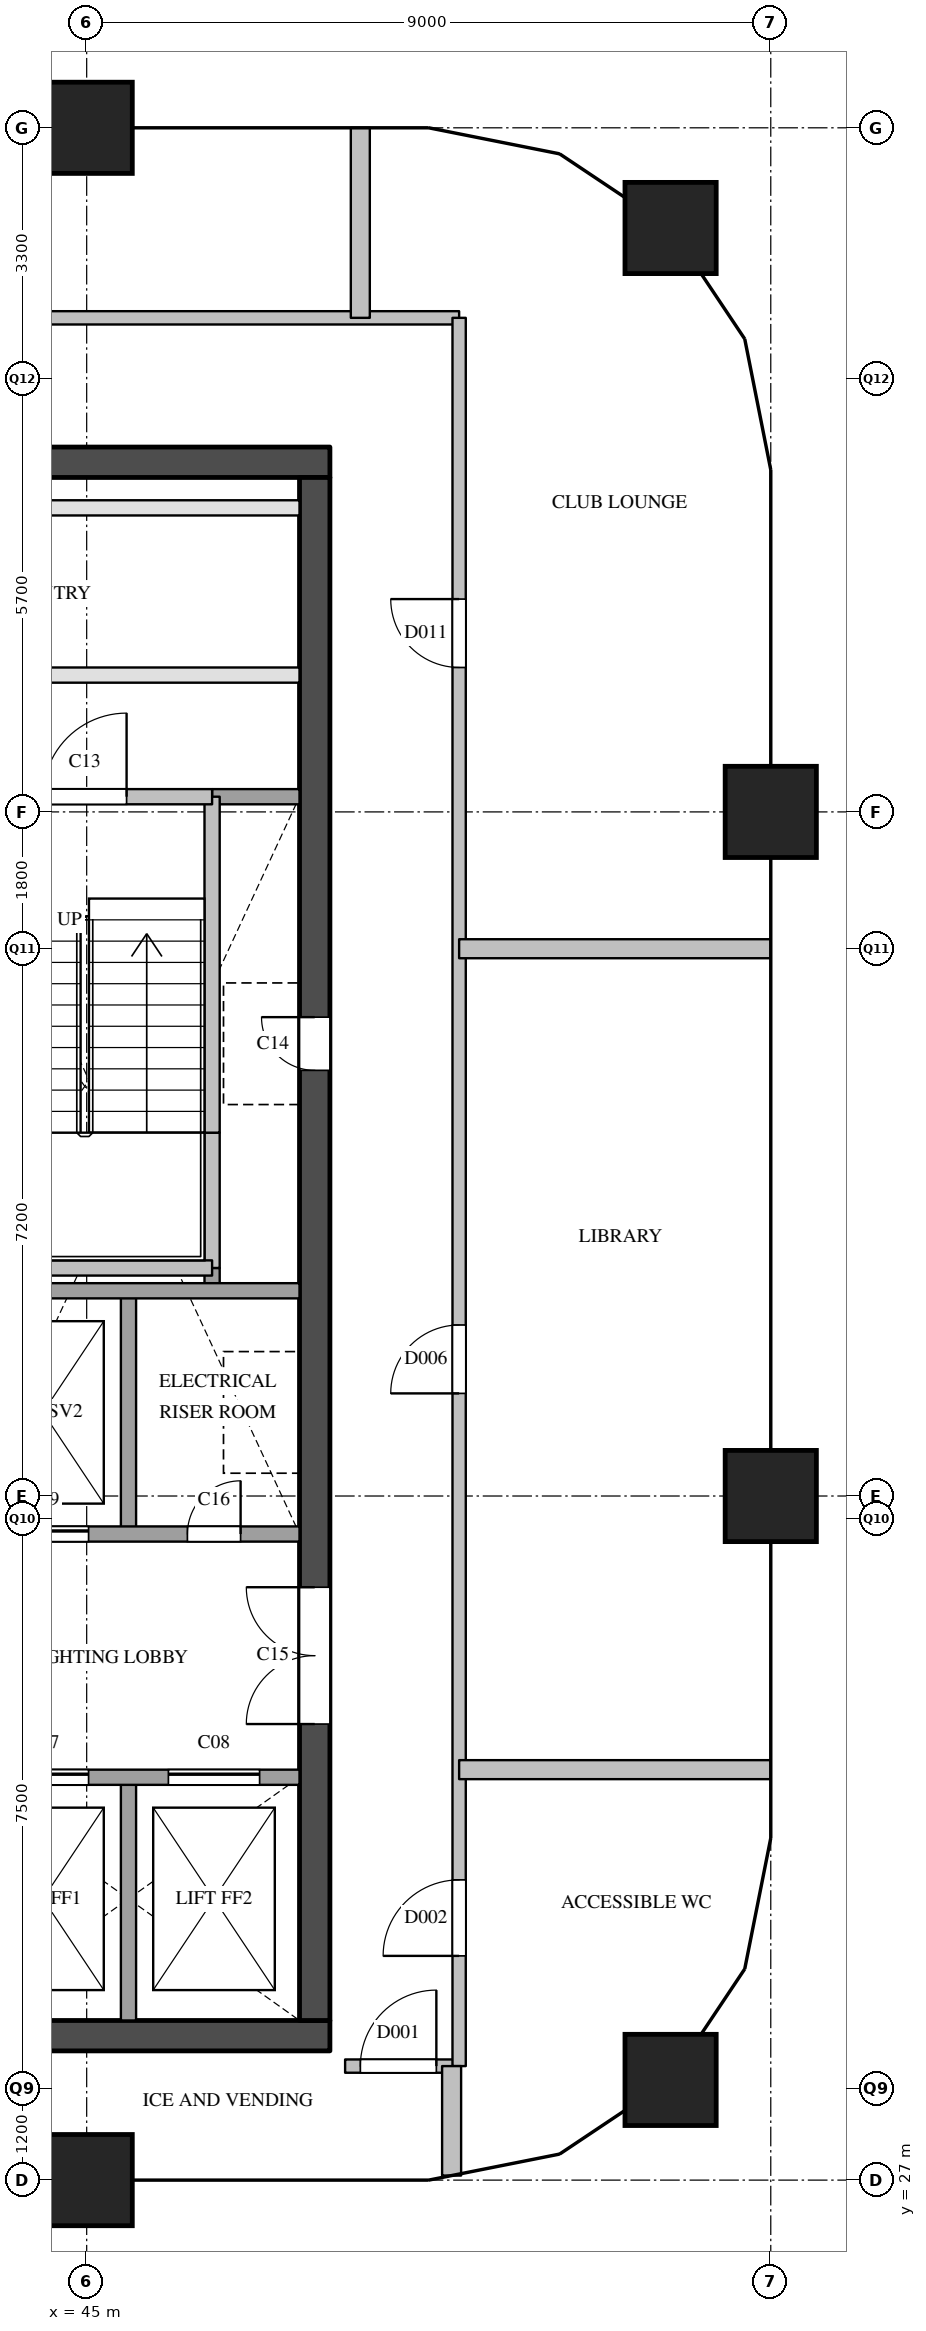
"""IFC4 building model, lengths in metres.
Left out: names, types, materials, properties, quantities, classifications, styles, units other than length and angle.
Written with IfcOpenShell. Run it as: python <this file> out.ifc"""

import sys

from ifc_helpers import new_model, si_unit, direction, frame, frame_2d, origin, origin_2d, place, context, subcontext, project, spatial, rectangle, extrude, element, fill, save


model = new_model("IFC4")
c1 = context("Model", 3, precision=1e-05, world=origin(), true_north=direction((0.0, 1.0)))
c2 = subcontext(c1, "Body", "Model", "MODEL_VIEW")
j1 = project(units=[si_unit("LENGTHUNIT", "METRE"), si_unit("PLANEANGLEUNIT", "RADIAN")], contexts=[c1])
p1 = place(None, origin())
s1 = spatial("IfcSite", under=j1, at=p1, CompositionType="ELEMENT")
p2 = place(p1, origin())
s2 = spatial("IfcBuilding", under=s1, at=p2, CompositionType="ELEMENT")
p3 = place(p2, frame((0.0, 0.0, 207.2)))
s3 = spatial("IfcBuildingStorey", under=s2, at=p3, CompositionType="ELEMENT", Elevation=207.2)
for number, where, z_axis, x_axis in (
    (1, (45.0, 27.0, 0.0), (0.0, 0.0, 1.0), (1.0, 0.0, 0.0)),
    (2, (45.0, 54.0, 0.0), (0.0, 0.0, 1.0), (1.0, 0.0, 0.0)),
    (3, (52.682, 28.318, 0.0), (0.0, 0.0, 1.0), (1.0, 0.0, 0.0)),
    (4, (54.0, 36.0, 0.0), (0.0, 0.0, 1.0), (1.0, 0.0, 0.0)),
    (5, (54.0, 45.0, 0.0), (0.0, 0.0, 1.0), (1.0, 0.0, 0.0)),
    (6, (52.682, 52.682, 0.0), (0.0, 0.0, 1.0), (1.0, 0.0, 0.0)),
):
    element("IfcColumn", number, at=place(p3, frame(where, z_axis=z_axis, x_axis=x_axis)), inside=s3, PredefinedType="COLUMN", context=c2, shape_type="SweptSolid", body=[
        extrude(rectangle(XDim=1.2, YDim=1.2, at=origin_2d()), origin(), (0.0, 0.0, 1.0), 3.9),
    ])
p4 = place(p3, frame((36.2, 28.9, 0.0), z_axis=(0.0, 0.0, 1.0), x_axis=(1.0, 0.0, 0.0)))
e7 = element("IfcWall", 7, at=p4, inside=s3, PredefinedType="SHEAR", context=c2, shape_type="SweptSolid", body=[
    extrude(rectangle(XDim=12.0, YDim=0.4, at=frame_2d((6.0, 0.0))), origin(), (0.0, 0.0, 1.0), 3.6),
])
p5 = place(p4, frame((0.85, 0.0, 0.0)))
e8 = element("IfcOpeningElement", 8, at=p5, cuts=e7, PredefinedType="OPENING", context=c2, shape_type="SweptSolid", body=[
    extrude(rectangle(XDim=1.2, YDim=2.1, at=frame_2d((0.6, 1.05))), frame((0.0, 0.21, 0.0), z_axis=(0.0, -1.0, 0.0), x_axis=(1.0, 0.0, 0.0)), (0.0, 0.0, 1.0), 0.42),
])
p6 = place(p4, frame((2.95, 0.0, 0.0)))
e9 = element("IfcOpeningElement", 9, at=p6, cuts=e7, PredefinedType="OPENING", context=c2, shape_type="SweptSolid", body=[
    extrude(rectangle(XDim=1.2, YDim=2.1, at=frame_2d((0.6, 1.05))), frame((0.0, 0.21, 0.0), z_axis=(0.0, -1.0, 0.0), x_axis=(1.0, 0.0, 0.0)), (0.0, 0.0, 1.0), 0.42),
])
p7 = place(p4, frame((5.05, 0.0, 0.0)))
e10 = element("IfcOpeningElement", 10, at=p7, cuts=e7, PredefinedType="OPENING", context=c2, shape_type="SweptSolid", body=[
    extrude(rectangle(XDim=1.2, YDim=2.1, at=frame_2d((0.6, 1.05))), frame((0.0, 0.21, 0.0), z_axis=(0.0, -1.0, 0.0), x_axis=(1.0, 0.0, 0.0)), (0.0, 0.0, 1.0), 0.42),
])
p8 = place(p3, frame((36.2, 49.6, 0.0), z_axis=(0.0, 0.0, 1.0), x_axis=(1.0, 0.0, 0.0)))
e11 = element("IfcWall", 11, at=p8, inside=s3, PredefinedType="SHEAR", context=c2, shape_type="SweptSolid", body=[
    extrude(rectangle(XDim=12.0, YDim=0.4, at=frame_2d((6.0, 0.0))), origin(), (0.0, 0.0, 1.0), 3.6),
])
p9 = place(p3, frame((48.0, 29.1, 0.0), z_axis=(0.0, 0.0, 1.0), x_axis=(0.0, 1.0, 0.0)))
e12 = element("IfcWall", 12, at=p9, inside=s3, PredefinedType="SHEAR", context=c2, shape_type="SweptSolid", body=[
    extrude(rectangle(XDim=20.3, YDim=0.4, at=frame_2d((10.15, 0.0))), origin(), (0.0, 0.0, 1.0), 3.6),
])
p10 = place(p9, frame((12.5, 0.0, 0.0)))
e13 = element("IfcOpeningElement", 13, at=p10, cuts=e12, PredefinedType="OPENING", context=c2, shape_type="SweptSolid", body=[
    extrude(rectangle(XDim=0.7, YDim=2.1, at=frame_2d((0.35, 1.05))), frame((0.0, 0.21, 0.0), z_axis=(0.0, -1.0, 0.0), x_axis=(1.0, 0.0, 0.0)), (0.0, 0.0, 1.0), 0.42),
])
p11 = place(p9, frame((3.9, 0.0, 0.0)))
e14 = element("IfcOpeningElement", 14, at=p11, cuts=e12, PredefinedType="OPENING", context=c2, shape_type="SweptSolid", body=[
    extrude(rectangle(XDim=1.8, YDim=2.1, at=frame_2d((0.9, 1.05))), frame((0.0, 0.21, 0.0), z_axis=(0.0, -1.0, 0.0), x_axis=(1.0, 0.0, 0.0)), (0.0, 0.0, 1.0), 0.42),
])
for number, where, z_axis, x_axis in (
    (15, (45.55, 29.1, 0.0), (0.0, 0.0, 1.0), (0.0, 1.0, 0.0)),
    (16, (45.55, 35.5, 0.0), (0.0, 0.0, 1.0), (0.0, 1.0, 0.0)),
):
    element("IfcWall", number, at=place(p3, frame(where, z_axis=z_axis, x_axis=x_axis)), inside=s3, PredefinedType="SOLIDWALL", context=c2, shape_type="SweptSolid", body=[
        extrude(rectangle(XDim=3.2, YDim=0.2, at=frame_2d((1.6, 0.0))), origin(), (0.0, 0.0, 1.0), 3.6),
    ])
p12 = place(p3, frame((46.65, 38.7, 0.0), z_axis=(0.0, 0.0, 1.0), x_axis=(0.0, 1.0, 0.0)))
e17 = element("IfcWall", 17, at=p12, inside=s3, PredefinedType="SOLIDWALL", context=c2, shape_type="SweptSolid", body=[
    extrude(rectangle(XDim=0.3, YDim=0.2, at=frame_2d((0.15, 0.0))), origin(), (0.0, 0.0, 1.0), 3.6),
])
p13 = place(p3, frame((46.65, 39.0, 0.0), z_axis=(0.0, 0.0, 1.0), x_axis=(0.0, 1.0, 0.0)))
e18 = element("IfcWall", 18, at=p13, inside=s3, PredefinedType="SOLIDWALL", context=c2, shape_type="SweptSolid", body=[
    extrude(rectangle(XDim=1.78, YDim=0.2, at=frame_2d((0.89, 0.0))), origin(), (0.0, 0.0, 1.0), 3.6),
])
p14 = place(p3, frame((46.65, 40.78, 0.0), z_axis=(0.0, 0.0, 1.0), x_axis=(0.0, 1.0, 0.0)))
e19 = element("IfcWall", 19, at=p14, inside=s3, PredefinedType="SOLIDWALL", context=c2, shape_type="SweptSolid", body=[
    extrude(rectangle(XDim=4.42, YDim=0.2, at=frame_2d((2.21, 0.0))), origin(), (0.0, 0.0, 1.0), 3.6),
])
p15 = place(p3, frame((36.6, 32.3, 0.0), z_axis=(0.0, 0.0, 1.0), x_axis=(1.0, 0.0, 0.0)))
e20 = element("IfcWall", 20, at=p15, inside=s3, PredefinedType="SOLIDWALL", context=c2, shape_type="SweptSolid", body=[
    extrude(rectangle(XDim=11.2, YDim=0.2, at=frame_2d((5.6, 0.0))), origin(), (0.0, 0.0, 1.0), 3.6),
])
p16 = place(p15, frame((7.225, 0.0, 0.0)))
e21 = element("IfcOpeningElement", 21, at=p16, cuts=e20, PredefinedType="OPENING", context=c2, shape_type="SweptSolid", body=[
    extrude(rectangle(XDim=1.2, YDim=2.1, at=frame_2d((0.6, 1.05))), frame((0.0, 0.11, 0.0), z_axis=(0.0, -1.0, 0.0), x_axis=(1.0, 0.0, 0.0)), (0.0, 0.0, 1.0), 0.22),
])
p17 = place(p15, frame((9.475, 0.0, 0.0)))
e22 = element("IfcOpeningElement", 22, at=p17, cuts=e20, PredefinedType="OPENING", context=c2, shape_type="SweptSolid", body=[
    extrude(rectangle(XDim=1.2, YDim=2.1, at=frame_2d((0.6, 1.05))), frame((0.0, 0.11, 0.0), z_axis=(0.0, -1.0, 0.0), x_axis=(1.0, 0.0, 0.0)), (0.0, 0.0, 1.0), 0.22),
])
p18 = place(p3, frame((43.3, 35.5, 0.0), z_axis=(0.0, 0.0, 1.0), x_axis=(1.0, 0.0, 0.0)))
e23 = element("IfcWall", 23, at=p18, inside=s3, PredefinedType="SOLIDWALL", context=c2, shape_type="SweptSolid", body=[
    extrude(rectangle(XDim=4.5, YDim=0.2, at=frame_2d((2.25, 0.0))), origin(), (0.0, 0.0, 1.0), 3.6),
])
p19 = place(p18, frame((0.525, 0.0, 0.0)))
e24 = element("IfcOpeningElement", 24, at=p19, cuts=e23, PredefinedType="OPENING", context=c2, shape_type="SweptSolid", body=[
    extrude(rectangle(XDim=1.2, YDim=2.1, at=frame_2d((0.6, 1.05))), frame((0.0, 0.11, 0.0), z_axis=(0.0, -1.0, 0.0), x_axis=(1.0, 0.0, 0.0)), (0.0, 0.0, 1.0), 0.22),
])
p20 = place(p18, frame((3.025, 0.0, 0.0)))
e25 = element("IfcOpeningElement", 25, at=p20, cuts=e23, PredefinedType="OPENING", context=c2, shape_type="SweptSolid", body=[
    extrude(rectangle(XDim=0.7, YDim=2.1, at=frame_2d((0.35, 1.05))), frame((0.0, 0.11, 0.0), z_axis=(0.0, -1.0, 0.0), x_axis=(1.0, 0.0, 0.0)), (0.0, 0.0, 1.0), 0.22),
])
p21 = place(p3, frame((43.3, 38.7, 0.0), z_axis=(0.0, 0.0, 1.0), x_axis=(1.0, 0.0, 0.0)))
e26 = element("IfcWall", 26, at=p21, inside=s3, PredefinedType="SOLIDWALL", context=c2, shape_type="SweptSolid", body=[
    extrude(rectangle(XDim=4.5, YDim=0.2, at=frame_2d((2.25, 0.0))), origin(), (0.0, 0.0, 1.0), 3.6),
])
p22 = place(p3, frame((43.4, 39.0, 0.0), z_axis=(0.0, 0.0, 1.0), x_axis=(1.0, 0.0, 0.0)))
e27 = element("IfcWall", 27, at=p22, inside=s3, PredefinedType="SOLIDWALL", context=c2, shape_type="SweptSolid", body=[
    extrude(rectangle(XDim=3.25, YDim=0.2, at=frame_2d((1.625, 0.0))), origin(), (0.0, 0.0, 1.0), 3.6),
])
p23 = place(p3, frame((46.65, 45.2, 0.0), z_axis=(0.0, 0.0, 1.0), x_axis=(1.0, 0.0, 0.0)))
e28 = element("IfcWall", 28, at=p23, inside=s3, PredefinedType="SOLIDWALL", context=c2, shape_type="SweptSolid", body=[
    extrude(rectangle(XDim=1.15, YDim=0.2, at=frame_2d((0.575, 0.0))), origin(), (0.0, 0.0, 1.0), 3.6),
])
p24 = place(p3, frame((36.6, 45.2, 0.0), z_axis=(0.0, 0.0, 1.0), x_axis=(1.0, 0.0, 0.0)))
e29 = element("IfcWall", 29, at=p24, inside=s3, PredefinedType="SOLIDWALL", context=c2, shape_type="SweptSolid", body=[
    extrude(rectangle(XDim=10.05, YDim=0.2, at=frame_2d((5.025, 0.0))), origin(), (0.0, 0.0, 1.0), 3.6),
])
p25 = place(p24, frame((1.125, 0.0, 0.0)))
e30 = element("IfcOpeningElement", 30, at=p25, cuts=e29, PredefinedType="OPENING", context=c2, shape_type="SweptSolid", body=[
    extrude(rectangle(XDim=1.1, YDim=2.1, at=frame_2d((0.55, 1.05))), frame((0.0, 0.11, 0.0), z_axis=(0.0, -1.0, 0.0), x_axis=(1.0, 0.0, 0.0)), (0.0, 0.0, 1.0), 0.22),
])
p26 = place(p24, frame((4.475, 0.0, 0.0)))
e31 = element("IfcOpeningElement", 31, at=p26, cuts=e29, PredefinedType="OPENING", context=c2, shape_type="SweptSolid", body=[
    extrude(rectangle(XDim=1.1, YDim=2.1, at=frame_2d((0.55, 1.05))), frame((0.0, 0.11, 0.0), z_axis=(0.0, -1.0, 0.0), x_axis=(1.0, 0.0, 0.0)), (0.0, 0.0, 1.0), 0.22),
])
p27 = place(p24, frame((7.825, 0.0, 0.0)))
e32 = element("IfcOpeningElement", 32, at=p27, cuts=e29, PredefinedType="OPENING", context=c2, shape_type="SweptSolid", body=[
    extrude(rectangle(XDim=1.1, YDim=2.1, at=frame_2d((0.55, 1.05))), frame((0.0, 0.11, 0.0), z_axis=(0.0, -1.0, 0.0), x_axis=(1.0, 0.0, 0.0)), (0.0, 0.0, 1.0), 0.22),
])
p28 = place(p3, frame((36.6, 46.8, 0.0), z_axis=(0.0, 0.0, 1.0), x_axis=(1.0, 0.0, 0.0)))
e33 = element("IfcWall", 33, at=p28, inside=s3, PredefinedType="PARTITIONING", context=c2, shape_type="SweptSolid", body=[
    extrude(rectangle(XDim=11.2, YDim=0.2, at=frame_2d((5.6, 0.0))), origin(), (0.0, 0.0, 1.0), 3.6),
])
p29 = place(p28, frame((0.67, 0.0, 0.0)))
e34 = element("IfcOpeningElement", 34, at=p29, cuts=e33, PredefinedType="OPENING", context=c2, shape_type="SweptSolid", body=[
    extrude(rectangle(XDim=0.9, YDim=2.1, at=frame_2d((0.45, 1.05))), frame((0.0, 0.11, 0.0), z_axis=(0.0, -1.0, 0.0), x_axis=(1.0, 0.0, 0.0)), (0.0, 0.0, 1.0), 0.22),
])
p30 = place(p28, frame((6.27, 0.0, 0.0)))
e35 = element("IfcOpeningElement", 35, at=p30, cuts=e33, PredefinedType="OPENING", context=c2, shape_type="SweptSolid", body=[
    extrude(rectangle(XDim=0.9, YDim=2.1, at=frame_2d((0.45, 1.05))), frame((0.0, 0.11, 0.0), z_axis=(0.0, -1.0, 0.0), x_axis=(1.0, 0.0, 0.0)), (0.0, 0.0, 1.0), 0.22),
])
p31 = place(p3, frame((36.6, 49.0, 0.0), z_axis=(0.0, 0.0, 1.0), x_axis=(1.0, 0.0, 0.0)))
e36 = element("IfcWall", 36, at=p31, inside=s3, PredefinedType="PARTITIONING", context=c2, shape_type="SweptSolid", body=[
    extrude(rectangle(XDim=11.2, YDim=0.2, at=frame_2d((5.6, 0.0))), origin(), (0.0, 0.0, 1.0), 3.6),
])
p32 = place(p3, frame((48.4, 28.5, 0.0), z_axis=(0.0, 0.0, 1.0), x_axis=(1.0, 0.0, 0.0)))
e37 = element("IfcWall", 37, at=p32, inside=s3, PredefinedType="PARTITIONING", context=c2, shape_type="SweptSolid", body=[
    extrude(rectangle(XDim=1.5, YDim=0.175, at=frame_2d((0.75, 0.0))), origin(), (0.0, 0.0, 1.0), 3.6),
])
p33 = place(p32, frame((0.2, 0.0, 0.0)))
e38 = element("IfcOpeningElement", 38, at=p33, cuts=e37, PredefinedType="OPENING", context=c2, shape_type="SweptSolid", body=[
    extrude(rectangle(XDim=1.0, YDim=2.1, at=frame_2d((0.5, 1.05))), frame((0.0, 0.097, 0.0), z_axis=(0.0, -1.0, 0.0), x_axis=(1.0, 0.0, 0.0)), (0.0, 0.0, 1.0), 0.195),
])
p34 = place(p3, frame((34.5, 51.5, 0.0), z_axis=(0.0, 0.0, 1.0), x_axis=(1.0, 0.0, 0.0)))
e39 = element("IfcWall", 39, at=p34, inside=s3, PredefinedType="PARTITIONING", context=c2, shape_type="SweptSolid", body=[
    extrude(rectangle(XDim=15.4, YDim=0.175, at=frame_2d((7.7, 0.0))), origin(), (0.0, 0.0, 1.0), 3.6),
])
p35 = place(p34, frame((8.25, 0.0, 0.0)))
e40 = element("IfcOpeningElement", 40, at=p35, cuts=e39, PredefinedType="OPENING", context=c2, shape_type="SweptSolid", body=[
    extrude(rectangle(XDim=0.9, YDim=2.1, at=frame_2d((0.45, 1.05))), frame((0.0, 0.097, 0.0), z_axis=(0.0, -1.0, 0.0), x_axis=(1.0, 0.0, 0.0)), (0.0, 0.0, 1.0), 0.195),
])
p36 = place(p3, frame((49.9, 28.5, 0.0), z_axis=(0.0, 0.0, 1.0), x_axis=(0.0, 1.0, 0.0)))
e41 = element("IfcWall", 41, at=p36, inside=s3, PredefinedType="PARTITIONING", context=c2, shape_type="SweptSolid", body=[
    extrude(rectangle(XDim=23.0, YDim=0.175, at=frame_2d((11.5, 0.0))), origin(), (0.0, 0.0, 1.0), 3.6),
])
p37 = place(p36, frame((1.45, 0.0, 0.0)))
e42 = element("IfcOpeningElement", 42, at=p37, cuts=e41, PredefinedType="OPENING", context=c2, shape_type="SweptSolid", body=[
    extrude(rectangle(XDim=1.0, YDim=2.1, at=frame_2d((0.5, 1.05))), frame((0.0, 0.097, 0.0), z_axis=(0.0, -1.0, 0.0), x_axis=(1.0, 0.0, 0.0)), (0.0, 0.0, 1.0), 0.195),
])
p38 = place(p36, frame((8.85, 0.0, 0.0)))
e43 = element("IfcOpeningElement", 43, at=p38, cuts=e41, PredefinedType="OPENING", context=c2, shape_type="SweptSolid", body=[
    extrude(rectangle(XDim=0.9, YDim=2.1, at=frame_2d((0.45, 1.05))), frame((0.0, 0.097, 0.0), z_axis=(0.0, -1.0, 0.0), x_axis=(1.0, 0.0, 0.0)), (0.0, 0.0, 1.0), 0.195),
])
p39 = place(p36, frame((18.4, 0.0, 0.0)))
e44 = element("IfcOpeningElement", 44, at=p39, cuts=e41, PredefinedType="OPENING", context=c2, shape_type="SweptSolid", body=[
    extrude(rectangle(XDim=0.9, YDim=2.1, at=frame_2d((0.45, 1.05))), frame((0.0, 0.097, 0.0), z_axis=(0.0, -1.0, 0.0), x_axis=(1.0, 0.0, 0.0)), (0.0, 0.0, 1.0), 0.195),
])
for number, where, z_axis, x_axis in (
    (45, (49.9, 32.4, 0.0), (0.0, 0.0, 1.0), (1.0, 0.0, 0.0)),
    (46, (49.9, 43.2, 0.0), (0.0, 0.0, 1.0), (1.0, 0.0, 0.0)),
):
    element("IfcWall", number, at=place(p3, frame(where, z_axis=z_axis, x_axis=x_axis)), inside=s3, PredefinedType="PARTITIONING", context=c2, shape_type="SweptSolid", body=[
        extrude(rectangle(XDim=4.1, YDim=0.25, at=frame_2d((2.05, 0.0))), origin(), (0.0, 0.0, 1.0), 2.6),
    ])
p40 = place(p3, frame((48.6, 51.5, 0.0), z_axis=(0.0, 0.0, 1.0), x_axis=(0.0, 1.0, 0.0)))
e47 = element("IfcWall", 47, at=p40, inside=s3, PredefinedType="PARTITIONING", context=c2, shape_type="SweptSolid", body=[
    extrude(rectangle(XDim=2.5, YDim=0.25, at=frame_2d((1.25, 0.0))), origin(), (0.0, 0.0, 1.0), 2.6),
])
p41 = place(p3, frame((49.801, 27.06, 0.0), z_axis=(0.0, 0.0, 1.0), x_axis=(0.0, 1.0, 0.0)))
e48 = element("IfcWall", 48, at=p41, inside=s3, PredefinedType="PARTITIONING", context=c2, shape_type="SweptSolid", body=[
    extrude(rectangle(XDim=1.44, YDim=0.25, at=frame_2d((0.72, 0.0))), origin(), (0.0, 0.0, 1.0), 2.6),
])
p42 = place(p16, origin())
e49 = element("IfcDoor", 49, at=p42, inside=s3, OperationType="SLIDING_TO_LEFT", PredefinedType="DOOR", context=c2, shape_type="SweptSolid", body=[
    extrude(rectangle(XDim=1.2, YDim=2.1, at=frame_2d((0.6, 1.05))), frame((0.0, 0.025, 0.0), z_axis=(0.0, -1.0, 0.0), x_axis=(1.0, 0.0, 0.0)), (0.0, 0.0, 1.0), 0.05),
])
fill(e21, e49)
p43 = place(p17, origin())
e50 = element("IfcDoor", 50, at=p43, inside=s3, OperationType="SLIDING_TO_LEFT", PredefinedType="DOOR", context=c2, shape_type="SweptSolid", body=[
    extrude(rectangle(XDim=1.2, YDim=2.1, at=frame_2d((0.6, 1.05))), frame((0.0, 0.025, 0.0), z_axis=(0.0, -1.0, 0.0), x_axis=(1.0, 0.0, 0.0)), (0.0, 0.0, 1.0), 0.05),
])
fill(e22, e50)
p44 = place(p19, origin())
e51 = element("IfcDoor", 51, at=p44, inside=s3, OperationType="SLIDING_TO_LEFT", PredefinedType="DOOR", context=c2, shape_type="SweptSolid", body=[
    extrude(rectangle(XDim=1.2, YDim=2.1, at=frame_2d((0.6, 1.05))), frame((0.0, 0.025, 0.0), z_axis=(0.0, -1.0, 0.0), x_axis=(1.0, 0.0, 0.0)), (0.0, 0.0, 1.0), 0.05),
])
fill(e24, e51)
p45 = place(p27, origin())
e52 = element("IfcDoor", 52, at=p45, inside=s3, OperationType="SINGLE_SWING_RIGHT", PredefinedType="DOOR", context=c2, shape_type="SweptSolid", body=[
    extrude(rectangle(XDim=1.1, YDim=2.1, at=frame_2d((0.55, 1.05))), frame((0.0, 0.025, 0.0), z_axis=(0.0, -1.0, 0.0), x_axis=(1.0, 0.0, 0.0)), (0.0, 0.0, 1.0), 0.05),
])
fill(e32, e52)
p46 = place(p10, origin())
e53 = element("IfcDoor", 53, at=p46, inside=s3, OperationType="SINGLE_SWING_RIGHT", PredefinedType="DOOR", context=c2, shape_type="SweptSolid", body=[
    extrude(rectangle(XDim=0.7, YDim=2.1, at=frame_2d((0.35, 1.05))), frame((0.0, 0.025, 0.0), z_axis=(0.0, -1.0, 0.0), x_axis=(1.0, 0.0, 0.0)), (0.0, 0.0, 1.0), 0.05),
])
fill(e13, e53)
p47 = place(p11, origin())
e54 = element("IfcDoor", 54, at=p47, inside=s3, OperationType="DOUBLE_DOOR_SINGLE_SWING", PredefinedType="DOOR", context=c2, shape_type="SweptSolid", body=[
    extrude(rectangle(XDim=1.8, YDim=2.1, at=frame_2d((0.9, 1.05))), frame((0.0, 0.025, 0.0), z_axis=(0.0, -1.0, 0.0), x_axis=(1.0, 0.0, 0.0)), (0.0, 0.0, 1.0), 0.05),
])
fill(e14, e54)
p48 = place(p20, origin())
e55 = element("IfcDoor", 55, at=p48, inside=s3, OperationType="SINGLE_SWING_RIGHT", PredefinedType="DOOR", context=c2, shape_type="SweptSolid", body=[
    extrude(rectangle(XDim=0.7, YDim=2.1, at=frame_2d((0.35, 1.05))), frame((0.0, 0.025, 0.0), z_axis=(0.0, -1.0, 0.0), x_axis=(1.0, 0.0, 0.0)), (0.0, 0.0, 1.0), 0.05),
])
fill(e25, e55)
p49 = place(p33, origin())
e56 = element("IfcDoor", 56, at=p49, inside=s3, OperationType="SINGLE_SWING_RIGHT", PredefinedType="DOOR", context=c2, shape_type="SweptSolid", body=[
    extrude(rectangle(XDim=1.0, YDim=2.1, at=frame_2d((0.5, 1.05))), frame((0.0, 0.025, 0.0), z_axis=(0.0, -1.0, 0.0), x_axis=(1.0, 0.0, 0.0)), (0.0, 0.0, 1.0), 0.05),
])
fill(e38, e56)
p50 = place(p37, origin())
e57 = element("IfcDoor", 57, at=p50, inside=s3, OperationType="SINGLE_SWING_LEFT", PredefinedType="DOOR", context=c2, shape_type="SweptSolid", body=[
    extrude(rectangle(XDim=1.0, YDim=2.1, at=frame_2d((0.5, 1.05))), frame((0.0, 0.025, 0.0), z_axis=(0.0, -1.0, 0.0), x_axis=(1.0, 0.0, 0.0)), (0.0, 0.0, 1.0), 0.05),
])
fill(e42, e57)
p51 = place(p38, origin())
e58 = element("IfcDoor", 58, at=p51, inside=s3, OperationType="SINGLE_SWING_LEFT", PredefinedType="DOOR", context=c2, shape_type="SweptSolid", body=[
    extrude(rectangle(XDim=0.9, YDim=2.1, at=frame_2d((0.45, 1.05))), frame((0.0, 0.025, 0.0), z_axis=(0.0, -1.0, 0.0), x_axis=(1.0, 0.0, 0.0)), (0.0, 0.0, 1.0), 0.05),
])
fill(e43, e58)
p52 = place(p39, origin())
e59 = element("IfcDoor", 59, at=p52, inside=s3, OperationType="SINGLE_SWING_RIGHT", PredefinedType="DOOR", context=c2, shape_type="SweptSolid", body=[
    extrude(rectangle(XDim=0.9, YDim=2.1, at=frame_2d((0.45, 1.05))), frame((0.0, 0.025, 0.0), z_axis=(0.0, -1.0, 0.0), x_axis=(1.0, 0.0, 0.0)), (0.0, 0.0, 1.0), 0.05),
])
fill(e44, e59)
save(model, sys.argv[1])
